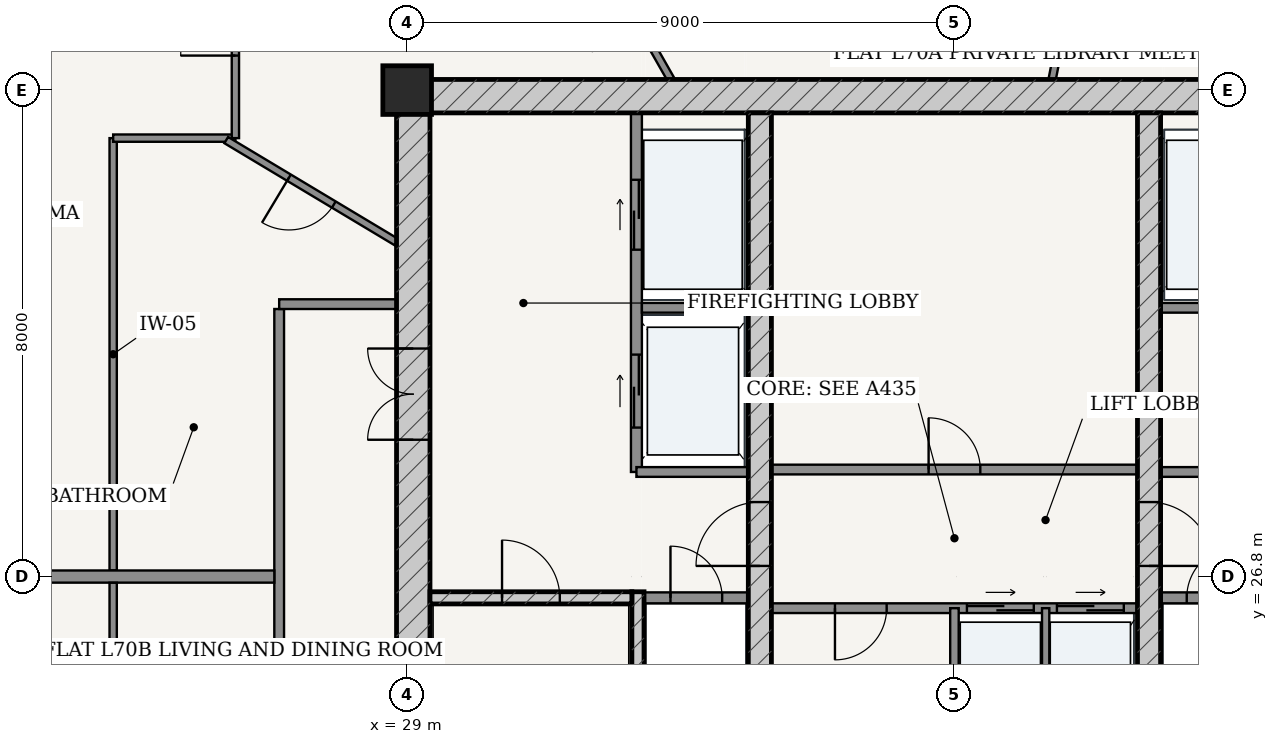
"""IFC4 building model, lengths in metres.
Left out: names, types, materials, properties, quantities, classifications, styles, units other than length and angle.
Written with IfcOpenShell. Run it as: python <this file> out.ifc"""

import sys

from ifc_helpers import new_model, si_unit, direction, frame, frame_2d, origin, origin_2d, place, context, subcontext, project, spatial, rectangle, extrude, source, transform, mapped, element, fill, save


model = new_model("IFC4")
c1 = context("Model", 3, precision=1e-05, world=origin(), true_north=direction((-0.2419218956, 0.970295726276)))
c2 = subcontext(c1, "Body", "Model", "MODEL_VIEW")
j1 = project(units=[si_unit("LENGTHUNIT", "METRE"), si_unit("PLANEANGLEUNIT", "RADIAN")], contexts=[c1])
p1 = place(None, origin())
s1 = spatial("IfcSite", under=j1, at=p1, CompositionType="ELEMENT")
p2 = place(p1, origin())
s2 = spatial("IfcBuilding", under=s1, at=p2, CompositionType="ELEMENT")
p3 = place(p2, frame((0.0, 0.0, 266.95)))
s3 = spatial("IfcBuildingStorey", under=s2, at=p3, CompositionType="ELEMENT", Elevation=266.95)
p4 = place(p3, frame((29.0, 34.8, 0.0), z_axis=(0.0, 0.0, 1.0), x_axis=(1.0, 0.0, 0.0)))
e1 = element("IfcColumn", 1, at=p4, inside=s3, PredefinedType="COLUMN", context=c2, shape_type="SweptSolid", body=[
    extrude(rectangle(XDim=0.8, YDim=0.8, at=origin_2d()), origin(), (0.0, 0.0, 1.0), 3.75),
])
p5 = place(p3, frame((28.825, 34.7, 0.0), z_axis=(0.0, 0.0, 1.0), x_axis=(1.0, 0.0, 0.0)))
e2 = element("IfcWall", 2, at=p5, inside=s3, PredefinedType="SHEAR", context=c2, shape_type="SweptSolid", body=[
    extrude(rectangle(XDim=18.35, YDim=0.55, at=frame_2d((9.175, 0.0))), origin(), (0.0, 0.0, 1.0), 3.49),
])
p6 = place(p3, frame((29.1, 19.175, 0.0), z_axis=(0.0, 0.0, 1.0), x_axis=(0.0, 1.0, 0.0)))
e3 = element("IfcWall", 3, at=p6, inside=s3, PredefinedType="SHEAR", context=c2, shape_type="SweptSolid", body=[
    extrude(rectangle(XDim=15.25, YDim=0.55, at=frame_2d((7.625, 0.0))), origin(), (0.0, 0.0, 1.0), 3.49),
])
p7 = place(p6, frame((9.875, 0.0, 0.0)))
e4 = element("IfcOpeningElement", 4, at=p7, cuts=e3, PredefinedType="OPENING", context=c2, shape_type="SweptSolid", body=[
    extrude(rectangle(XDim=1.5, YDim=2.2, at=frame_2d((0.75, 1.1))), frame((0.0, 0.285, 0.0), z_axis=(0.0, -1.0, 0.0), x_axis=(1.0, 0.0, 0.0)), (0.0, 0.0, 1.0), 0.57),
])
p8 = place(p3, frame((32.795, 19.175, 0.0), z_axis=(0.0, 0.0, 1.0), x_axis=(0.0, 1.0, 0.0)))
e5 = element("IfcWall", 5, at=p8, inside=s3, PredefinedType="SOLIDWALL", context=c2, shape_type="SweptSolid", body=[
    extrude(rectangle(XDim=7.375, YDim=0.2, at=frame_2d((3.688, 0.0))), origin(), (0.0, 0.0, 1.0), 3.49),
])
p9 = place(p3, frame((29.375, 26.45, 0.0), z_axis=(0.0, 0.0, 1.0), x_axis=(1.0, 0.0, 0.0)))
e6 = element("IfcWall", 6, at=p9, inside=s3, PredefinedType="SOLIDWALL", context=c2, shape_type="SweptSolid", body=[
    extrude(rectangle(XDim=3.32, YDim=0.2, at=frame_2d((1.66, 0.0))), origin(), (0.0, 0.0, 1.0), 3.49),
])
p10 = place(p9, frame((1.185, 0.0, 0.0)))
e7 = element("IfcOpeningElement", 7, at=p10, cuts=e6, PredefinedType="OPENING", context=c2, shape_type="SweptSolid", body=[
    extrude(rectangle(XDim=0.95, YDim=2.15, at=frame_2d((0.475, 1.075))), frame((0.0, 0.11, 0.0), z_axis=(0.0, -1.0, 0.0), x_axis=(1.0, 0.0, 0.0)), (0.0, 0.0, 1.0), 0.22),
])
p11 = place(p3, frame((34.8, 19.175, 0.0), z_axis=(0.0, 0.0, 1.0), x_axis=(0.0, 1.0, 0.0)))
e8 = element("IfcWall", 8, at=p11, inside=s3, PredefinedType="SHEAR", context=c2, shape_type="SweptSolid", body=[
    extrude(rectangle(XDim=15.25, YDim=0.38, at=frame_2d((7.625, 0.0))), origin(), (0.0, 0.0, 1.0), 3.49),
])
p12 = place(p11, frame((7.8, 0.0, 0.0)))
e9 = element("IfcOpeningElement", 9, at=p12, cuts=e8, PredefinedType="OPENING", context=c2, shape_type="SweptSolid", body=[
    extrude(rectangle(XDim=1.05, YDim=2.15, at=frame_2d((0.525, 1.075))), frame((0.0, 0.2, 0.0), z_axis=(0.0, -1.0, 0.0), x_axis=(1.0, 0.0, 0.0)), (0.0, 0.0, 1.0), 0.4),
])
p13 = place(p3, frame((41.2, 19.175, 0.0), z_axis=(0.0, 0.0, 1.0), x_axis=(0.0, 1.0, 0.0)))
e10 = element("IfcWall", 10, at=p13, inside=s3, PredefinedType="SHEAR", context=c2, shape_type="SweptSolid", body=[
    extrude(rectangle(XDim=15.25, YDim=0.38, at=frame_2d((7.625, 0.0))), origin(), (0.0, 0.0, 1.0), 3.49),
])
p14 = place(p13, frame((7.8, 0.0, 0.0)))
e11 = element("IfcOpeningElement", 11, at=p14, cuts=e10, PredefinedType="OPENING", context=c2, shape_type="SweptSolid", body=[
    extrude(rectangle(XDim=1.05, YDim=2.15, at=frame_2d((0.525, 1.075))), frame((0.0, 0.2, 0.0), z_axis=(0.0, -1.0, 0.0), x_axis=(1.0, 0.0, 0.0)), (0.0, 0.0, 1.0), 0.4),
])
p15 = place(p3, frame((32.9, 26.45, 0.0), z_axis=(0.0, 0.0, 1.0), x_axis=(1.0, 0.0, 0.0)))
e12 = element("IfcWall", 12, at=p15, inside=s3, PredefinedType="PARTITIONING", context=c2, shape_type="SweptSolid", body=[
    extrude(rectangle(XDim=1.71, YDim=0.18, at=frame_2d((0.855, 0.0))), origin(), (0.0, 0.0, 1.0), 3.49),
])
p16 = place(p15, frame((0.43, 0.0, 0.0)))
e13 = element("IfcOpeningElement", 13, at=p16, cuts=e12, PredefinedType="OPENING", context=c2, shape_type="SweptSolid", body=[
    extrude(rectangle(XDim=0.85, YDim=2.1, at=frame_2d((0.425, 1.05))), frame((0.0, 0.1, 0.0), z_axis=(0.0, -1.0, 0.0), x_axis=(1.0, 0.0, 0.0)), (0.0, 0.0, 1.0), 0.2),
])
p17 = place(p3, frame((41.39, 26.45, 0.0), z_axis=(0.0, 0.0, 1.0), x_axis=(1.0, 0.0, 0.0)))
e14 = element("IfcWall", 14, at=p17, inside=s3, PredefinedType="PARTITIONING", context=c2, shape_type="SweptSolid", body=[
    extrude(rectangle(XDim=1.71, YDim=0.18, at=frame_2d((0.855, 0.0))), origin(), (0.0, 0.0, 1.0), 3.49),
])
p18 = place(p17, frame((0.43, 0.0, 0.0)))
e15 = element("IfcOpeningElement", 15, at=p18, cuts=e14, PredefinedType="OPENING", context=c2, shape_type="SweptSolid", body=[
    extrude(rectangle(XDim=0.85, YDim=2.1, at=frame_2d((0.425, 1.05))), frame((0.0, 0.1, 0.0), z_axis=(0.0, -1.0, 0.0), x_axis=(1.0, 0.0, 0.0)), (0.0, 0.0, 1.0), 0.2),
])
p19 = place(p3, frame((32.77, 28.52, 0.0), z_axis=(0.0, 0.0, 1.0), x_axis=(0.0, 1.0, 0.0)))
e16 = element("IfcWall", 16, at=p19, inside=s3, PredefinedType="PARTITIONING", context=c2, shape_type="SweptSolid", body=[
    extrude(rectangle(XDim=5.905, YDim=0.18, at=frame_2d((2.953, 0.0))), origin(), (0.0, 0.0, 1.0), 3.49),
])
p20 = place(p19, frame((3.655, 0.0, 0.0)))
e17 = element("IfcOpeningElement", 17, at=p20, cuts=e16, PredefinedType="OPENING", context=c2, shape_type="SweptSolid", body=[
    extrude(rectangle(XDim=1.15, YDim=2.2, at=frame_2d((0.575, 1.1))), frame((0.0, 0.1, 0.0), z_axis=(0.0, -1.0, 0.0), x_axis=(1.0, 0.0, 0.0)), (0.0, 0.0, 1.0), 0.2),
])
p21 = place(p19, frame((0.73, 0.0, 0.0)))
e18 = element("IfcOpeningElement", 18, at=p21, cuts=e16, PredefinedType="OPENING", context=c2, shape_type="SweptSolid", body=[
    extrude(rectangle(XDim=1.2, YDim=2.25, at=frame_2d((0.6, 1.125))), frame((0.0, 0.1, 0.0), z_axis=(0.0, -1.0, 0.0), x_axis=(1.0, 0.0, 0.0)), (0.0, 0.0, 1.0), 0.2),
])
p22 = place(p3, frame((32.86, 31.22, 0.0), z_axis=(0.0, 0.0, 1.0), x_axis=(1.0, 0.0, 0.0)))
e19 = element("IfcWall", 19, at=p22, inside=s3, PredefinedType="PARTITIONING", context=c2, shape_type="SweptSolid", body=[
    extrude(rectangle(XDim=1.75, YDim=0.16, at=frame_2d((0.875, 0.0))), origin(), (0.0, 0.0, 1.0), 3.49),
])
p23 = place(p3, frame((32.77, 28.52, 0.0), z_axis=(0.0, 0.0, 1.0), x_axis=(1.0, 0.0, 0.0)))
e20 = element("IfcWall", 20, at=p23, inside=s3, PredefinedType="PARTITIONING", context=c2, shape_type="SweptSolid", body=[
    extrude(rectangle(XDim=1.84, YDim=0.16, at=frame_2d((0.92, 0.0))), origin(), (0.0, 0.0, 1.0), 3.49),
])
p24 = place(p3, frame((41.39, 31.22, 0.0), z_axis=(0.0, 0.0, 1.0), x_axis=(1.0, 0.0, 0.0)))
e21 = element("IfcWall", 21, at=p24, inside=s3, PredefinedType="PARTITIONING", context=c2, shape_type="SweptSolid", body=[
    extrude(rectangle(XDim=1.75, YDim=0.16, at=frame_2d((0.875, 0.0))), origin(), (0.0, 0.0, 1.0), 3.49),
])
p25 = place(p3, frame((41.39, 28.52, 0.0), z_axis=(0.0, 0.0, 1.0), x_axis=(1.0, 0.0, 0.0)))
e22 = element("IfcWall", 22, at=p25, inside=s3, PredefinedType="PARTITIONING", context=c2, shape_type="SweptSolid", body=[
    extrude(rectangle(XDim=1.84, YDim=0.16, at=frame_2d((0.92, 0.0))), origin(), (0.0, 0.0, 1.0), 3.49),
])
p26 = place(p3, frame((34.99, 28.56, 0.0), z_axis=(0.0, 0.0, 1.0), x_axis=(1.0, 0.0, 0.0)))
e23 = element("IfcWall", 23, at=p26, inside=s3, PredefinedType="PARTITIONING", context=c2, shape_type="SweptSolid", body=[
    extrude(rectangle(XDim=6.02, YDim=0.16, at=frame_2d((3.01, 0.0))), origin(), (0.0, 0.0, 1.0), 3.49),
])
p27 = place(p26, frame((2.585, 0.0, 0.0)))
e24 = element("IfcOpeningElement", 24, at=p27, cuts=e23, PredefinedType="OPENING", context=c2, shape_type="SweptSolid", body=[
    extrude(rectangle(XDim=0.85, YDim=2.1, at=frame_2d((0.425, 1.05))), frame((0.0, 0.09, 0.0), z_axis=(0.0, -1.0, 0.0), x_axis=(1.0, 0.0, 0.0)), (0.0, 0.0, 1.0), 0.18),
])
p28 = place(p3, frame((34.99, 26.28, 0.0), z_axis=(0.0, 0.0, 1.0), x_axis=(1.0, 0.0, 0.0)))
e25 = element("IfcWall", 25, at=p28, inside=s3, PredefinedType="PARTITIONING", context=c2, shape_type="SweptSolid", body=[
    extrude(rectangle(XDim=6.02, YDim=0.16, at=frame_2d((3.01, 0.0))), origin(), (0.0, 0.0, 1.0), 3.49),
])
p29 = place(p28, frame((1.045, 0.0, 0.0)))
e26 = element("IfcOpeningElement", 26, at=p29, cuts=e25, PredefinedType="OPENING", context=c2, shape_type="SweptSolid", body=[
    extrude(rectangle(XDim=0.85, YDim=2.1, at=frame_2d((0.425, 1.05))), frame((0.0, 0.09, 0.0), z_axis=(0.0, -1.0, 0.0), x_axis=(1.0, 0.0, 0.0)), (0.0, 0.0, 1.0), 0.18),
])
p30 = place(p28, frame((3.215, 0.0, 0.0)))
e27 = element("IfcOpeningElement", 27, at=p30, cuts=e25, PredefinedType="OPENING", context=c2, shape_type="SweptSolid", body=[
    extrude(rectangle(XDim=1.1, YDim=2.2, at=frame_2d((0.55, 1.1))), frame((0.0, 0.09, 0.0), z_axis=(0.0, -1.0, 0.0), x_axis=(1.0, 0.0, 0.0)), (0.0, 0.0, 1.0), 0.18),
])
p31 = place(p28, frame((4.695, 0.0, 0.0)))
e28 = element("IfcOpeningElement", 28, at=p31, cuts=e25, PredefinedType="OPENING", context=c2, shape_type="SweptSolid", body=[
    extrude(rectangle(XDim=1.1, YDim=2.2, at=frame_2d((0.55, 1.1))), frame((0.0, 0.09, 0.0), z_axis=(0.0, -1.0, 0.0), x_axis=(1.0, 0.0, 0.0)), (0.0, 0.0, 1.0), 0.18),
])
p32 = place(p3, frame((38.0, 23.72, 0.0), z_axis=(0.0, 0.0, 1.0), x_axis=(0.0, 1.0, 0.0)))
e29 = element("IfcWall", 29, at=p32, inside=s3, PredefinedType="PARTITIONING", context=c2, shape_type="SweptSolid", body=[
    extrude(rectangle(XDim=2.56, YDim=0.14, at=frame_2d((1.28, 0.0))), origin(), (0.0, 0.0, 1.0), 3.49),
])
p33 = place(p3, frame((39.5, 23.72, 0.0), z_axis=(0.0, 0.0, 1.0), x_axis=(0.0, 1.0, 0.0)))
e30 = element("IfcWall", 30, at=p33, inside=s3, PredefinedType="PARTITIONING", context=c2, shape_type="SweptSolid", body=[
    extrude(rectangle(XDim=2.56, YDim=0.12, at=frame_2d((1.28, 0.0))), origin(), (0.0, 0.0, 1.0), 3.49),
])
p34 = place(p3, frame((26.895, 17.275, 0.0), z_axis=(0.0, 0.0, 1.0), x_axis=(0.0, 1.0, 0.0)))
e31 = element("IfcWall", 31, at=p34, inside=s3, PredefinedType="PARTITIONING", context=c2, shape_type="SweptSolid", body=[
    extrude(rectangle(XDim=13.925, YDim=0.16, at=frame_2d((6.962, 0.0))), origin(), (0.0, 0.0, 1.0), 3.015),
])
p35 = place(p34, frame((1.992, 0.0, 0.0)))
e32 = element("IfcOpeningElement", 32, at=p35, cuts=e31, PredefinedType="OPENING", context=c2, shape_type="SweptSolid", body=[
    extrude(rectangle(XDim=0.98, YDim=2.2, at=frame_2d((0.49, 1.1))), frame((0.0, 0.09, 0.0), z_axis=(0.0, -1.0, 0.0), x_axis=(1.0, 0.0, 0.0)), (0.0, 0.0, 1.0), 0.18),
])
p36 = place(p3, frame((26.895, 31.28, 0.0), z_axis=(0.0, 0.0, 1.0), x_axis=(1.0, 0.0, 0.0)))
e33 = element("IfcWall", 33, at=p36, inside=s3, PredefinedType="PARTITIONING", context=c2, shape_type="SweptSolid", body=[
    extrude(rectangle(XDim=1.93, YDim=0.16, at=frame_2d((0.965, 0.0))), origin(), (0.0, 0.0, 1.0), 3.49),
])
p37 = place(p3, frame((24.165, 26.902, 0.0), z_axis=(0.0, 0.0, 1.0), x_axis=(0.0, 1.0, 0.0)))
e34 = element("IfcWall", 34, at=p37, inside=s3, PredefinedType="PARTITIONING", context=c2, shape_type="SweptSolid", body=[
    extrude(rectangle(XDim=7.108, YDim=0.12, at=frame_2d((3.554, 0.0))), origin(), (0.0, 0.0, 1.0), 3.015),
])
p38 = place(p3, frame((24.165, 34.01, 0.0), z_axis=(0.0, 0.0, 1.0), x_axis=(1.0, 0.0, 0.0)))
e35 = element("IfcWall", 35, at=p38, inside=s3, PredefinedType="PARTITIONING", context=c2, shape_type="SweptSolid", body=[
    extrude(rectangle(XDim=2.01, YDim=0.12, at=frame_2d((1.005, 0.0))), origin(), (0.0, 0.0, 1.0), 3.209),
])
p39 = place(p3, frame((26.175, 34.01, 0.0), z_axis=(0.0, 0.0, 1.0), x_axis=(0.0, 1.0, 0.0)))
e36 = element("IfcWall", 36, at=p39, inside=s3, PredefinedType="PARTITIONING", context=c2, shape_type="SweptSolid", body=[
    extrude(rectangle(XDim=3.615, YDim=0.12, at=frame_2d((1.808, 0.0))), origin(), (0.0, 0.0, 1.0), 3.015),
])
p40 = place(p39, frame((1.357, 0.0, 0.0)))
e37 = element("IfcOpeningElement", 37, at=p40, cuts=e36, PredefinedType="OPENING", context=c2, shape_type="SweptSolid", body=[
    extrude(rectangle(XDim=0.9, YDim=2.15, at=frame_2d((0.45, 1.075))), frame((0.0, 0.07, 0.0), z_axis=(0.0, -1.0, 0.0), x_axis=(1.0, 0.0, 0.0)), (0.0, 0.0, 1.0), 0.14),
])
p41 = place(p3, frame((39.607, 34.977, 0.0), z_axis=(0.0, 0.0, 1.0), x_axis=(0.192785105701, 0.981241001497, 0.0)))
e38 = element("IfcWall", 38, at=p41, inside=s3, PredefinedType="PARTITIONING", context=c2, shape_type="SweptSolid", body=[
    extrude(rectangle(XDim=2.637, YDim=0.12, at=frame_2d((1.318, 0.0))), origin(), (0.0, 0.0, 1.0), 2.575),
])
p42 = place(p3, frame((33.336, 34.977, 0.0), z_axis=(0.0, 0.0, 1.0), x_axis=(-0.495399243909, 0.868665406894, 0.0)))
e39 = element("IfcWall", 39, at=p42, inside=s3, PredefinedType="PARTITIONING", context=c2, shape_type="SweptSolid", body=[
    extrude(rectangle(XDim=2.987, YDim=0.12, at=frame_2d((1.493, 0.0))), origin(), (0.0, 0.0, 1.0), 3.49),
])
p43 = place(p42, frame((1.043, 0.0, 0.0)))
e40 = element("IfcOpeningElement", 40, at=p43, cuts=e39, PredefinedType="OPENING", context=c2, shape_type="SweptSolid", body=[
    extrude(rectangle(XDim=0.9, YDim=2.15, at=frame_2d((0.45, 1.075))), frame((0.0, 0.07, 0.0), z_axis=(0.0, -1.0, 0.0), x_axis=(1.0, 0.0, 0.0)), (0.0, 0.0, 1.0), 0.14),
])
p44 = place(p3, frame((28.825, 32.3, 0.0), z_axis=(0.0, 0.0, 1.0), x_axis=(-0.857743539935, 0.514077834282, 0.0)))
e41 = element("IfcWall", 41, at=p44, inside=s3, PredefinedType="PARTITIONING", context=c2, shape_type="SweptSolid", body=[
    extrude(rectangle(XDim=3.265, YDim=0.12, at=frame_2d((1.632, 0.0))), origin(), (0.0, 0.0, 1.0), 3.49),
])
p45 = place(p44, frame((1.202, 0.0, 0.0)))
e42 = element("IfcOpeningElement", 42, at=p45, cuts=e41, PredefinedType="OPENING", context=c2, shape_type="SweptSolid", body=[
    extrude(rectangle(XDim=0.86, YDim=2.15, at=frame_2d((0.43, 1.075))), frame((0.0, 0.07, 0.0), z_axis=(0.0, -1.0, 0.0), x_axis=(1.0, 0.0, 0.0)), (0.0, 0.0, 1.0), 0.14),
])
p46 = place(p3, frame((26.815, 26.8, 0.0), z_axis=(0.0, 0.0, 1.0), x_axis=(-1.0, 0.0, 0.0)))
e43 = element("IfcWall", 43, at=p46, inside=s3, PredefinedType="PARTITIONING", context=c2, shape_type="SweptSolid", body=[
    extrude(rectangle(XDim=8.155, YDim=0.2, at=frame_2d((4.078, 0.0))), origin(), (0.0, 0.0, 1.0), 3.121),
])
p47 = place(p3, frame((24.165, 14.465, 0.0), z_axis=(0.0, 0.0, 1.0), x_axis=(0.0, 1.0, 0.0)))
e44 = element("IfcWall", 44, at=p47, inside=s3, PredefinedType="PARTITIONING", context=c2, shape_type="SweptSolid", body=[
    extrude(rectangle(XDim=12.233, YDim=0.12, at=frame_2d((6.116, 0.0))), origin(), (0.0, 0.0, 1.0), 3.015),
])
p48 = place(p47, frame((3.863, 0.0, 0.0)))
e45 = element("IfcOpeningElement", 45, at=p48, cuts=e44, PredefinedType="OPENING", context=c2, shape_type="SweptSolid", body=[
    extrude(rectangle(XDim=0.9, YDim=2.15, at=frame_2d((0.45, 1.075))), frame((0.0, 0.07, 0.0), z_axis=(0.0, -1.0, 0.0), x_axis=(1.0, 0.0, 0.0)), (0.0, 0.0, 1.0), 0.14),
])
m1 = source(origin(), c2, "Body", "SweptSolid", [
    extrude(rectangle(XDim=1.5, YDim=2.2, at=frame_2d((0.75, 1.1))), frame((0.0, 0.025, 0.0), z_axis=(0.0, -1.0, 0.0), x_axis=(1.0, 0.0, 0.0)), (0.0, 0.0, 1.0), 0.05),
])
p49 = place(p7, origin())
e46 = element("IfcDoor", 46, at=p49, inside=s3, OperationType="DOUBLE_DOOR_SINGLE_SWING", PredefinedType="DOOR", context=c2, shape_type="MappedRepresentation", body=[
    mapped(m1, transform((0.0, 0.0, 0.0), scale=1.0)),
])
fill(e4, e46)
m2 = source(origin(), c2, "Body", "SweptSolid", [
    extrude(rectangle(XDim=1.05, YDim=2.15, at=frame_2d((0.525, 1.075))), frame((0.0, 0.025, 0.0), z_axis=(0.0, -1.0, 0.0), x_axis=(1.0, 0.0, 0.0)), (0.0, 0.0, 1.0), 0.05),
])
p50 = place(p12, origin())
e47 = element("IfcDoor", 47, at=p50, inside=s3, OperationType="SINGLE_SWING_LEFT", PredefinedType="DOOR", context=c2, shape_type="MappedRepresentation", body=[
    mapped(m2, transform((0.0, 0.0, 0.0), scale=1.0)),
])
fill(e9, e47)
p51 = place(p14, frame((1.05, 0.0, 0.0), z_axis=(0.0, 0.0, 1.0), x_axis=(-1.0, 0.0, 0.0)))
e48 = element("IfcDoor", 48, at=p51, inside=s3, OperationType="SINGLE_SWING_RIGHT", PredefinedType="DOOR", context=c2, shape_type="MappedRepresentation", body=[
    mapped(m2, transform((0.0, 0.0, 0.0), scale=1.0)),
])
fill(e11, e48)
m3 = source(origin(), c2, "Body", "SweptSolid", [
    extrude(rectangle(XDim=0.95, YDim=2.15, at=frame_2d((0.475, 1.075))), frame((0.0, 0.025, 0.0), z_axis=(0.0, -1.0, 0.0), x_axis=(1.0, 0.0, 0.0)), (0.0, 0.0, 1.0), 0.05),
])
p52 = place(p10, origin())
e49 = element("IfcDoor", 49, at=p52, inside=s3, OperationType="SINGLE_SWING_LEFT", PredefinedType="DOOR", context=c2, shape_type="MappedRepresentation", body=[
    mapped(m3, transform((0.0, 0.0, 0.0), scale=1.0)),
])
fill(e7, e49)
m4 = source(origin(), c2, "Body", "SweptSolid", [
    extrude(rectangle(XDim=0.85, YDim=2.1, at=frame_2d((0.425, 1.05))), frame((0.0, 0.025, 0.0), z_axis=(0.0, -1.0, 0.0), x_axis=(1.0, 0.0, 0.0)), (0.0, 0.0, 1.0), 0.05),
])
p53 = place(p16, origin())
e50 = element("IfcDoor", 50, at=p53, inside=s3, OperationType="SINGLE_SWING_LEFT", PredefinedType="DOOR", context=c2, shape_type="MappedRepresentation", body=[
    mapped(m4, transform((0.0, 0.0, 0.0), scale=1.0)),
])
fill(e13, e50)
p54 = place(p18, origin())
e51 = element("IfcDoor", 51, at=p54, inside=s3, OperationType="SINGLE_SWING_RIGHT", PredefinedType="DOOR", context=c2, shape_type="MappedRepresentation", body=[
    mapped(m4, transform((0.0, 0.0, 0.0), scale=1.0)),
])
fill(e15, e51)
p55 = place(p27, origin())
e52 = element("IfcDoor", 52, at=p55, inside=s3, OperationType="SINGLE_SWING_LEFT", PredefinedType="DOOR", context=c2, shape_type="MappedRepresentation", body=[
    mapped(m4, transform((0.0, 0.0, 0.0), scale=1.0)),
])
fill(e24, e52)
p56 = place(p29, frame((0.85, 0.0, 0.0), z_axis=(0.0, 0.0, 1.0), x_axis=(-1.0, 0.0, 0.0)))
e53 = element("IfcDoor", 53, at=p56, inside=s3, OperationType="SINGLE_SWING_RIGHT", PredefinedType="DOOR", context=c2, shape_type="MappedRepresentation", body=[
    mapped(m4, transform((0.0, 0.0, 0.0), scale=1.0)),
])
fill(e26, e53)
m5 = source(origin(), c2, "Body", "SweptSolid", [
    extrude(rectangle(XDim=1.15, YDim=2.2, at=frame_2d((0.575, 1.1))), frame((0.0, 0.025, 0.0), z_axis=(0.0, -1.0, 0.0), x_axis=(1.0, 0.0, 0.0)), (0.0, 0.0, 1.0), 0.05),
])
p57 = place(p20, origin())
e54 = element("IfcDoor", 54, at=p57, inside=s3, OperationType="DOUBLE_DOOR_SLIDING", PredefinedType="DOOR", context=c2, shape_type="MappedRepresentation", body=[
    mapped(m5, transform((0.0, 0.0, 0.0), scale=1.0)),
])
fill(e17, e54)
m6 = source(origin(), c2, "Body", "SweptSolid", [
    extrude(rectangle(XDim=1.2, YDim=2.25, at=frame_2d((0.6, 1.125))), frame((0.0, 0.025, 0.0), z_axis=(0.0, -1.0, 0.0), x_axis=(1.0, 0.0, 0.0)), (0.0, 0.0, 1.0), 0.05),
])
p58 = place(p21, origin())
e55 = element("IfcDoor", 55, at=p58, inside=s3, OperationType="DOUBLE_DOOR_SLIDING", PredefinedType="DOOR", context=c2, shape_type="MappedRepresentation", body=[
    mapped(m6, transform((0.0, 0.0, 0.0), scale=1.0)),
])
fill(e18, e55)
m7 = source(origin(), c2, "Body", "SweptSolid", [
    extrude(rectangle(XDim=1.1, YDim=2.2, at=frame_2d((0.55, 1.1))), frame((0.0, 0.025, 0.0), z_axis=(0.0, -1.0, 0.0), x_axis=(1.0, 0.0, 0.0)), (0.0, 0.0, 1.0), 0.05),
])
p59 = place(p30, origin())
e56 = element("IfcDoor", 56, at=p59, inside=s3, OperationType="DOUBLE_DOOR_SLIDING", PredefinedType="DOOR", context=c2, shape_type="MappedRepresentation", body=[
    mapped(m7, transform((0.0, 0.0, 0.0), scale=1.0)),
])
fill(e27, e56)
p60 = place(p31, origin())
e57 = element("IfcDoor", 57, at=p60, inside=s3, OperationType="DOUBLE_DOOR_SLIDING", PredefinedType="DOOR", context=c2, shape_type="MappedRepresentation", body=[
    mapped(m7, transform((0.0, 0.0, 0.0), scale=1.0)),
])
fill(e28, e57)
m8 = source(origin(), c2, "Body", "SweptSolid", [
    extrude(rectangle(XDim=0.86, YDim=2.15, at=frame_2d((0.43, 1.075))), frame((0.0, 0.025, 0.0), z_axis=(0.0, -1.0, 0.0), x_axis=(1.0, 0.0, 0.0)), (0.0, 0.0, 1.0), 0.05),
])
p61 = place(p45, origin())
e58 = element("IfcDoor", 58, at=p61, inside=s3, OperationType="SINGLE_SWING_RIGHT", PredefinedType="DOOR", context=c2, shape_type="MappedRepresentation", body=[
    mapped(m8, transform((0.0, 0.0, 0.0), scale=1.0)),
])
fill(e42, e58)
m9 = source(origin(), c2, "Body", "SweptSolid", [
    extrude(rectangle(XDim=0.9, YDim=2.15, at=frame_2d((0.45, 1.075))), frame((0.0, 0.025, 0.0), z_axis=(0.0, -1.0, 0.0), x_axis=(1.0, 0.0, 0.0)), (0.0, 0.0, 1.0), 0.05),
])
p62 = place(p40, origin())
e59 = element("IfcDoor", 59, at=p62, inside=s3, OperationType="SINGLE_SWING_LEFT", PredefinedType="DOOR", context=c2, shape_type="MappedRepresentation", body=[
    mapped(m9, transform((0.0, 0.0, 0.0), scale=1.0)),
])
fill(e37, e59)
save(model, sys.argv[1])
